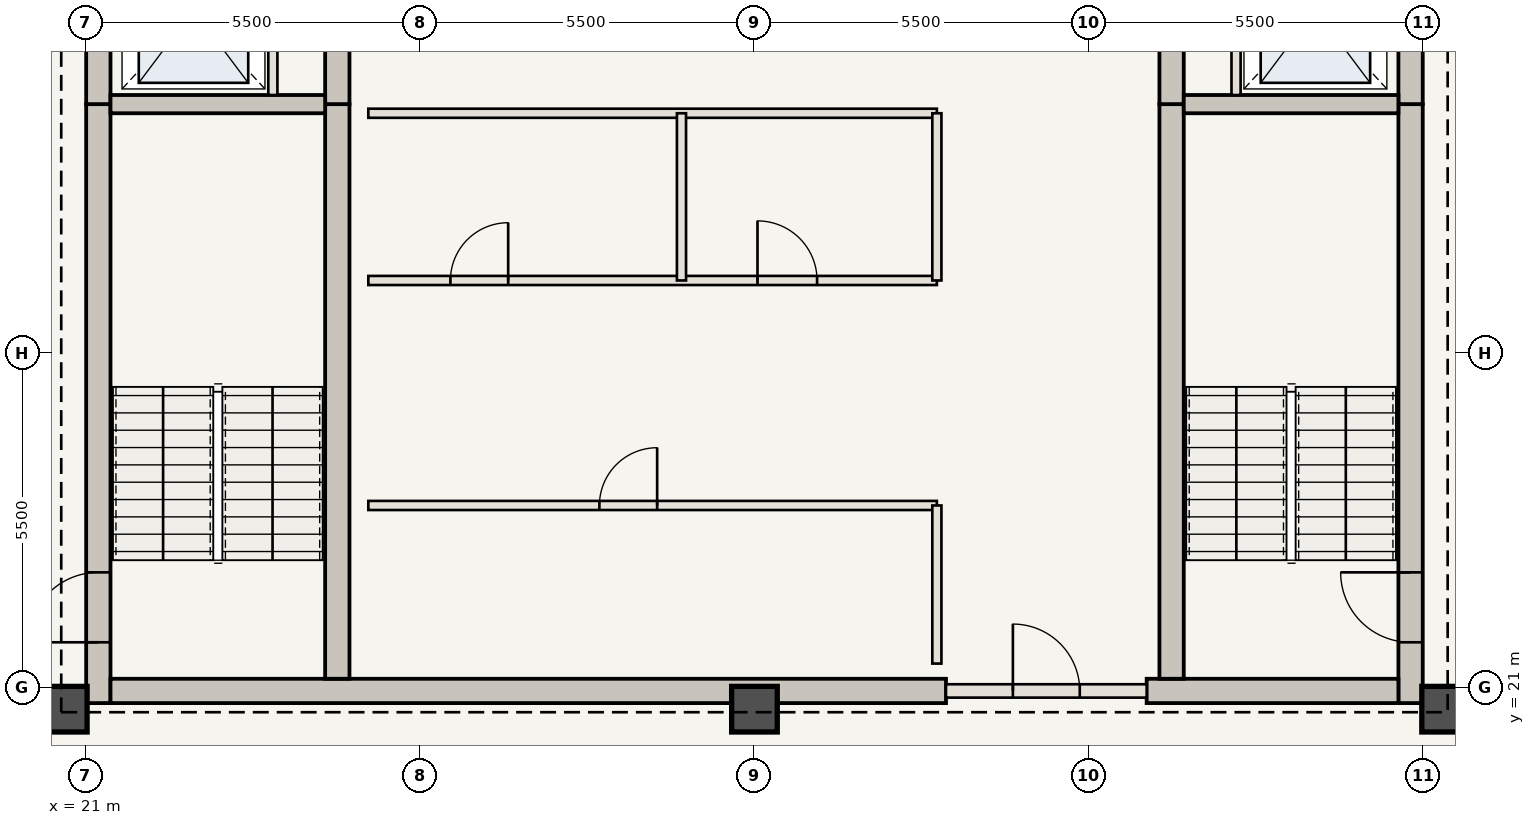
"""IFC4 building model, lengths in metres.
Left out: names, types, materials, properties, quantities, classifications, styles, units other than length and angle.
Written with IfcOpenShell. Run it as: python <this file> out.ifc"""

import sys

from ifc_helpers import new_model, si_unit, direction, frame, frame_2d, origin, origin_2d, place, context, subcontext, project, spatial, rectangle, extrude, element, fill, save


model = new_model("IFC4")
c1 = context("Model", 3, precision=1e-05, world=origin(), true_north=direction((0.0, 1.0)))
c2 = subcontext(c1, "Body", "Model", "MODEL_VIEW")
j1 = project(units=[si_unit("LENGTHUNIT", "METRE"), si_unit("PLANEANGLEUNIT", "RADIAN")], contexts=[c1])
p1 = place(None, origin())
s1 = spatial("IfcSite", under=j1, at=p1, CompositionType="ELEMENT")
p2 = place(p1, origin())
s2 = spatial("IfcBuilding", under=s1, at=p2, CompositionType="ELEMENT")
p3 = place(p2, frame((0.0, 0.0, 304.5)))
s3 = spatial("IfcBuildingStorey", under=s2, at=p3, CompositionType="ELEMENT", Elevation=304.5)
p4 = place(p3, frame((21.21, 20.75, 0.0), z_axis=(0.0, 0.0, 1.0), x_axis=(0.0, 1.0, 0.0)))
e1 = element("IfcWall", 1, at=p4, inside=s3, PredefinedType="SHEAR", context=c2, shape_type="SweptSolid", body=[
    extrude(rectangle(XDim=9.85, YDim=0.4, at=frame_2d((4.925, 0.0))), origin(), (0.0, 0.0, 1.0), 3.85),
])
p5 = place(p4, frame((1.0, 0.0, 0.0)))
e2 = element("IfcOpeningElement", 2, at=p5, cuts=e1, PredefinedType="OPENING", context=c2, shape_type="SweptSolid", body=[
    extrude(rectangle(XDim=1.15, YDim=2.15, at=frame_2d((0.575, 1.075))), frame((0.0, 0.21, 0.0), z_axis=(0.0, -1.0, 0.0), x_axis=(1.0, 0.0, 0.0)), (0.0, 0.0, 1.0), 0.42),
])
p6 = place(p3, frame((21.21, 30.6, 0.0), z_axis=(0.0, 0.0, 1.0), x_axis=(0.0, 1.0, 0.0)))
e3 = element("IfcWall", 3, at=p6, inside=s3, PredefinedType="SHEAR", context=c2, shape_type="SweptSolid", body=[
    extrude(rectangle(XDim=12.6, YDim=0.4, at=frame_2d((6.3, 0.0))), origin(), (0.0, 0.0, 1.0), 3.85),
])
p7 = place(p6, frame((4.2, 0.0, 0.0)))
e4 = element("IfcOpeningElement", 4, at=p7, cuts=e3, PredefinedType="OPENING", context=c2, shape_type="SweptSolid", body=[
    extrude(rectangle(XDim=1.1, YDim=2.15, at=frame_2d((0.55, 1.075))), frame((0.0, 0.21, 0.0), z_axis=(0.0, -1.0, 0.0), x_axis=(1.0, 0.0, 0.0)), (0.0, 0.0, 1.0), 0.42),
])
p8 = place(p6, frame((9.2, 0.0, 0.0)))
e5 = element("IfcOpeningElement", 5, at=p8, cuts=e3, PredefinedType="OPENING", context=c2, shape_type="SweptSolid", body=[
    extrude(rectangle(XDim=0.92, YDim=2.1, at=frame_2d((0.46, 1.05))), frame((0.0, 0.21, 0.0), z_axis=(0.0, -1.0, 0.0), x_axis=(1.0, 0.0, 0.0)), (0.0, 0.0, 1.0), 0.42),
])
p9 = place(p3, frame((42.79, 20.75, 0.0), z_axis=(0.0, 0.0, 1.0), x_axis=(0.0, 1.0, 0.0)))
e6 = element("IfcWall", 6, at=p9, inside=s3, PredefinedType="SHEAR", context=c2, shape_type="SweptSolid", body=[
    extrude(rectangle(XDim=9.85, YDim=0.4, at=frame_2d((4.925, 0.0))), origin(), (0.0, 0.0, 1.0), 3.85),
])
p10 = place(p9, frame((1.0, 0.0, 0.0)))
e7 = element("IfcOpeningElement", 7, at=p10, cuts=e6, PredefinedType="OPENING", context=c2, shape_type="SweptSolid", body=[
    extrude(rectangle(XDim=1.15, YDim=2.15, at=frame_2d((0.575, 1.075))), frame((0.0, 0.21, 0.0), z_axis=(0.0, -1.0, 0.0), x_axis=(1.0, 0.0, 0.0)), (0.0, 0.0, 1.0), 0.42),
])
p11 = place(p3, frame((42.79, 30.6, 0.0), z_axis=(0.0, 0.0, 1.0), x_axis=(0.0, 1.0, 0.0)))
e8 = element("IfcWall", 8, at=p11, inside=s3, PredefinedType="SHEAR", context=c2, shape_type="SweptSolid", body=[
    extrude(rectangle(XDim=12.6, YDim=0.4, at=frame_2d((6.3, 0.0))), origin(), (0.0, 0.0, 1.0), 3.85),
])
p12 = place(p11, frame((4.2, 0.0, 0.0)))
e9 = element("IfcOpeningElement", 9, at=p12, cuts=e8, PredefinedType="OPENING", context=c2, shape_type="SweptSolid", body=[
    extrude(rectangle(XDim=1.1, YDim=2.15, at=frame_2d((0.55, 1.075))), frame((0.0, 0.21, 0.0), z_axis=(0.0, -1.0, 0.0), x_axis=(1.0, 0.0, 0.0)), (0.0, 0.0, 1.0), 0.42),
])
p13 = place(p11, frame((8.05, 0.0, 0.0)))
e10 = element("IfcOpeningElement", 10, at=p13, cuts=e8, PredefinedType="OPENING", context=c2, shape_type="SweptSolid", body=[
    extrude(rectangle(XDim=0.88, YDim=2.1, at=frame_2d((0.44, 1.05))), frame((0.0, 0.21, 0.0), z_axis=(0.0, -1.0, 0.0), x_axis=(1.0, 0.0, 0.0)), (0.0, 0.0, 1.0), 0.42),
])
p14 = place(p11, frame((9.45, 0.0, 0.0)))
e11 = element("IfcOpeningElement", 11, at=p14, cuts=e8, PredefinedType="OPENING", context=c2, shape_type="SweptSolid", body=[
    extrude(rectangle(XDim=0.88, YDim=2.1, at=frame_2d((0.44, 1.05))), frame((0.0, 0.21, 0.0), z_axis=(0.0, -1.0, 0.0), x_axis=(1.0, 0.0, 0.0)), (0.0, 0.0, 1.0), 0.42),
])
p15 = place(p11, frame((10.85, 0.0, 0.0)))
e12 = element("IfcOpeningElement", 12, at=p15, cuts=e8, PredefinedType="OPENING", context=c2, shape_type="SweptSolid", body=[
    extrude(rectangle(XDim=0.88, YDim=2.1, at=frame_2d((0.44, 1.05))), frame((0.0, 0.21, 0.0), z_axis=(0.0, -1.0, 0.0), x_axis=(1.0, 0.0, 0.0)), (0.0, 0.0, 1.0), 0.42),
])
p16 = place(p3, frame((21.41, 20.95, 0.0), z_axis=(0.0, 0.0, 1.0), x_axis=(1.0, 0.0, 0.0)))
e13 = element("IfcWall", 13, at=p16, inside=s3, PredefinedType="SHEAR", context=c2, shape_type="SweptSolid", body=[
    extrude(rectangle(XDim=13.74, YDim=0.4, at=frame_2d((6.87, 0.0))), origin(), (0.0, 0.0, 1.0), 3.85),
])
p17 = place(p3, frame((38.45, 20.95, 0.0), z_axis=(0.0, 0.0, 1.0), x_axis=(1.0, 0.0, 0.0)))
e14 = element("IfcWall", 14, at=p17, inside=s3, PredefinedType="SHEAR", context=c2, shape_type="SweptSolid", body=[
    extrude(rectangle(XDim=4.14, YDim=0.4, at=frame_2d((2.07, 0.0))), origin(), (0.0, 0.0, 1.0), 3.85),
])
p18 = place(p3, frame((25.14, 21.15, 0.0), z_axis=(0.0, 0.0, 1.0), x_axis=(0.0, 1.0, 0.0)))
e15 = element("IfcWall", 15, at=p18, inside=s3, PredefinedType="SHEAR", context=c2, shape_type="SweptSolid", body=[
    extrude(rectangle(XDim=9.45, YDim=0.4, at=frame_2d((4.725, 0.0))), origin(), (0.0, 0.0, 1.0), 3.85),
])
p19 = place(p3, frame((25.14, 30.6, 0.0), z_axis=(0.0, 0.0, 1.0), x_axis=(0.0, 1.0, 0.0)))
e16 = element("IfcWall", 16, at=p19, inside=s3, PredefinedType="SHEAR", context=c2, shape_type="SweptSolid", body=[
    extrude(rectangle(XDim=12.2, YDim=0.4, at=frame_2d((6.1, 0.0))), origin(), (0.0, 0.0, 1.0), 3.85),
])
p20 = place(p19, frame((6.25, 0.0, 0.0)))
e17 = element("IfcOpeningElement", 17, at=p20, cuts=e16, PredefinedType="OPENING", context=c2, shape_type="SweptSolid", body=[
    extrude(rectangle(XDim=1.1, YDim=2.15, at=frame_2d((0.55, 1.075))), frame((0.0, 0.21, 0.0), z_axis=(0.0, -1.0, 0.0), x_axis=(1.0, 0.0, 0.0)), (0.0, 0.0, 1.0), 0.42),
])
p21 = place(p3, frame((38.86, 21.15, 0.0), z_axis=(0.0, 0.0, 1.0), x_axis=(0.0, 1.0, 0.0)))
e18 = element("IfcWall", 18, at=p21, inside=s3, PredefinedType="SHEAR", context=c2, shape_type="SweptSolid", body=[
    extrude(rectangle(XDim=9.45, YDim=0.4, at=frame_2d((4.725, 0.0))), origin(), (0.0, 0.0, 1.0), 3.85),
])
p22 = place(p3, frame((38.86, 30.6, 0.0), z_axis=(0.0, 0.0, 1.0), x_axis=(0.0, 1.0, 0.0)))
e19 = element("IfcWall", 19, at=p22, inside=s3, PredefinedType="SHEAR", context=c2, shape_type="SweptSolid", body=[
    extrude(rectangle(XDim=12.2, YDim=0.4, at=frame_2d((6.1, 0.0))), origin(), (0.0, 0.0, 1.0), 3.85),
])
for number, where, z_axis, x_axis in (
    (20, (20.65, 20.65, 0.0), (0.0, 0.0, 1.0), (1.0, 0.0, 0.0)),
    (21, (32.0, 20.65, 0.0), (0.0, 0.0, 1.0), (1.0, 0.0, 0.0)),
    (22, (43.35, 20.65, 0.0), (0.0, 0.0, 1.0), (1.0, 0.0, 0.0)),
):
    element("IfcColumn", number, at=place(p3, frame(where, z_axis=z_axis, x_axis=x_axis)), inside=s3, PredefinedType="COLUMN", context=c2, shape_type="SweptSolid", body=[
        extrude(rectangle(XDim=0.75, YDim=0.75, at=origin_2d()), origin(), (0.0, 0.0, 1.0), 3.85),
    ])
for number, where, z_axis, x_axis in (
    (23, (21.41, 30.6, 0.0), (0.0, 0.0, 1.0), (1.0, 0.0, 0.0)),
    (24, (39.06, 30.6, 0.0), (0.0, 0.0, 1.0), (1.0, 0.0, 0.0)),
):
    element("IfcWall", number, at=place(p3, frame(where, z_axis=z_axis, x_axis=x_axis)), inside=s3, PredefinedType="SHEAR", context=c2, shape_type="SweptSolid", body=[
        extrude(rectangle(XDim=3.53, YDim=0.3, at=frame_2d((1.765, 0.0))), origin(), (0.0, 0.0, 1.0), 3.63),
    ])
for number, where, z_axis, x_axis in (
    (25, (24.08, 30.75, 0.0), (0.0, 0.0, 1.0), (0.0, 1.0, 0.0)),
    (26, (39.92, 30.75, 0.0), (0.0, 0.0, 1.0), (0.0, 1.0, 0.0)),
):
    element("IfcWall", number, at=place(p3, frame(where, z_axis=z_axis, x_axis=x_axis)), inside=s3, PredefinedType="STANDARD", context=c2, shape_type="SweptSolid", body=[
        extrude(rectangle(XDim=2.65, YDim=0.15, at=frame_2d((1.325, 0.0))), origin(), (0.0, 0.0, 1.0), 3.63),
    ])
p23 = place(p3, frame((35.15, 20.95, 0.0), z_axis=(0.0, 0.0, 1.0), x_axis=(1.0, 0.0, 0.0)))
e27 = element("IfcWall", 27, at=p23, inside=s3, PredefinedType="STANDARD", context=c2, shape_type="SweptSolid", body=[
    extrude(rectangle(XDim=3.3, YDim=0.22, at=frame_2d((1.65, 0.0))), origin(), (0.0, 0.0, 1.0), 3.63),
])
p24 = place(p23, frame((1.1, 0.0, 0.0)))
e28 = element("IfcOpeningElement", 28, at=p24, cuts=e27, PredefinedType="OPENING", context=c2, shape_type="SweptSolid", body=[
    extrude(rectangle(XDim=1.1, YDim=2.15, at=frame_2d((0.55, 1.075))), frame((0.0, 0.12, 0.0), z_axis=(0.0, -1.0, 0.0), x_axis=(1.0, 0.0, 0.0)), (0.0, 0.0, 1.0), 0.24),
])
p25 = place(p3, frame((25.65, 24.0, 0.0), z_axis=(0.0, 0.0, 1.0), x_axis=(1.0, 0.0, 0.0)))
e29 = element("IfcWall", 29, at=p25, inside=s3, PredefinedType="STANDARD", context=c2, shape_type="SweptSolid", body=[
    extrude(rectangle(XDim=9.35, YDim=0.15, at=frame_2d((4.675, 0.0))), origin(), (0.0, 0.0, 1.0), 3.63),
])
p26 = place(p25, frame((3.8, 0.0, 0.0)))
e30 = element("IfcOpeningElement", 30, at=p26, cuts=e29, PredefinedType="OPENING", context=c2, shape_type="SweptSolid", body=[
    extrude(rectangle(XDim=0.95, YDim=2.15, at=frame_2d((0.475, 1.075))), frame((0.0, 0.085, 0.0), z_axis=(0.0, -1.0, 0.0), x_axis=(1.0, 0.0, 0.0)), (0.0, 0.0, 1.0), 0.17),
])
p27 = place(p3, frame((35.0, 21.4, 0.0), z_axis=(0.0, 0.0, 1.0), x_axis=(0.0, 1.0, 0.0)))
e31 = element("IfcWall", 31, at=p27, inside=s3, PredefinedType="STANDARD", context=c2, shape_type="SweptSolid", body=[
    extrude(rectangle(XDim=2.6, YDim=0.15, at=frame_2d((1.3, 0.0))), origin(), (0.0, 0.0, 1.0), 3.63),
])
p28 = place(p3, frame((25.65, 27.7, 0.0), z_axis=(0.0, 0.0, 1.0), x_axis=(1.0, 0.0, 0.0)))
e32 = element("IfcWall", 32, at=p28, inside=s3, PredefinedType="STANDARD", context=c2, shape_type="SweptSolid", body=[
    extrude(rectangle(XDim=9.35, YDim=0.15, at=frame_2d((4.675, 0.0))), origin(), (0.0, 0.0, 1.0), 3.63),
])
p29 = place(p28, frame((1.35, 0.0, 0.0)))
e33 = element("IfcOpeningElement", 33, at=p29, cuts=e32, PredefinedType="OPENING", context=c2, shape_type="SweptSolid", body=[
    extrude(rectangle(XDim=0.95, YDim=2.15, at=frame_2d((0.475, 1.075))), frame((0.0, 0.085, 0.0), z_axis=(0.0, -1.0, 0.0), x_axis=(1.0, 0.0, 0.0)), (0.0, 0.0, 1.0), 0.17),
])
p30 = place(p28, frame((6.4, 0.0, 0.0)))
e34 = element("IfcOpeningElement", 34, at=p30, cuts=e32, PredefinedType="OPENING", context=c2, shape_type="SweptSolid", body=[
    extrude(rectangle(XDim=0.98, YDim=2.2, at=frame_2d((0.49, 1.1))), frame((0.0, 0.085, 0.0), z_axis=(0.0, -1.0, 0.0), x_axis=(1.0, 0.0, 0.0)), (0.0, 0.0, 1.0), 0.17),
])
p31 = place(p3, frame((25.65, 30.45, 0.0), z_axis=(0.0, 0.0, 1.0), x_axis=(1.0, 0.0, 0.0)))
e35 = element("IfcWall", 35, at=p31, inside=s3, PredefinedType="STANDARD", context=c2, shape_type="SweptSolid", body=[
    extrude(rectangle(XDim=9.35, YDim=0.15, at=frame_2d((4.675, 0.0))), origin(), (0.0, 0.0, 1.0), 3.63),
])
for number, where, z_axis, x_axis in (
    (36, (30.8, 27.7, 0.0), (0.0, 0.0, 1.0), (0.0, 1.0, 0.0)),
    (37, (35.0, 27.7, 0.0), (0.0, 0.0, 1.0), (0.0, 1.0, 0.0)),
):
    element("IfcWall", number, at=place(p3, frame(where, z_axis=z_axis, x_axis=x_axis)), inside=s3, PredefinedType="STANDARD", context=c2, shape_type="SweptSolid", body=[
        extrude(rectangle(XDim=2.75, YDim=0.15, at=frame_2d((1.375, 0.0))), origin(), (0.0, 0.0, 1.0), 3.63),
    ])
p32 = place(p5, origin())
e38 = element("IfcDoor", 38, at=p32, inside=s3, OperationType="SINGLE_SWING_LEFT", PredefinedType="DOOR", context=c2, shape_type="SweptSolid", body=[
    extrude(rectangle(XDim=1.15, YDim=2.15, at=frame_2d((0.575, 1.075))), frame((0.0, 0.025, 0.0), z_axis=(0.0, -1.0, 0.0), x_axis=(1.0, 0.0, 0.0)), (0.0, 0.0, 1.0), 0.05),
])
fill(e2, e38)
p33 = place(p10, origin())
e39 = element("IfcDoor", 39, at=p33, inside=s3, OperationType="SINGLE_SWING_RIGHT", PredefinedType="DOOR", context=c2, shape_type="SweptSolid", body=[
    extrude(rectangle(XDim=1.15, YDim=2.15, at=frame_2d((0.575, 1.075))), frame((0.0, 0.025, 0.0), z_axis=(0.0, -1.0, 0.0), x_axis=(1.0, 0.0, 0.0)), (0.0, 0.0, 1.0), 0.05),
])
fill(e7, e39)
p34 = place(p24, origin())
e40 = element("IfcDoor", 40, at=p34, inside=s3, OperationType="SINGLE_SWING_LEFT", PredefinedType="DOOR", context=c2, shape_type="SweptSolid", body=[
    extrude(rectangle(XDim=1.1, YDim=2.15, at=frame_2d((0.55, 1.075))), frame((0.0, 0.025, 0.0), z_axis=(0.0, -1.0, 0.0), x_axis=(1.0, 0.0, 0.0)), (0.0, 0.0, 1.0), 0.05),
])
fill(e28, e40)
p35 = place(p26, origin())
e41 = element("IfcDoor", 41, at=p35, inside=s3, OperationType="SINGLE_SWING_RIGHT", PredefinedType="DOOR", context=c2, shape_type="SweptSolid", body=[
    extrude(rectangle(XDim=0.95, YDim=2.15, at=frame_2d((0.475, 1.075))), frame((0.0, 0.025, 0.0), z_axis=(0.0, -1.0, 0.0), x_axis=(1.0, 0.0, 0.0)), (0.0, 0.0, 1.0), 0.05),
])
fill(e30, e41)
p36 = place(p29, origin())
e42 = element("IfcDoor", 42, at=p36, inside=s3, OperationType="SINGLE_SWING_RIGHT", PredefinedType="DOOR", context=c2, shape_type="SweptSolid", body=[
    extrude(rectangle(XDim=0.95, YDim=2.15, at=frame_2d((0.475, 1.075))), frame((0.0, 0.025, 0.0), z_axis=(0.0, -1.0, 0.0), x_axis=(1.0, 0.0, 0.0)), (0.0, 0.0, 1.0), 0.05),
])
fill(e33, e42)
p37 = place(p30, origin())
e43 = element("IfcDoor", 43, at=p37, inside=s3, OperationType="SINGLE_SWING_LEFT", PredefinedType="DOOR", context=c2, shape_type="SweptSolid", body=[
    extrude(rectangle(XDim=0.98, YDim=2.2, at=frame_2d((0.49, 1.1))), frame((0.0, 0.025, 0.0), z_axis=(0.0, -1.0, 0.0), x_axis=(1.0, 0.0, 0.0)), (0.0, 0.0, 1.0), 0.05),
])
fill(e34, e43)
save(model, sys.argv[1])
